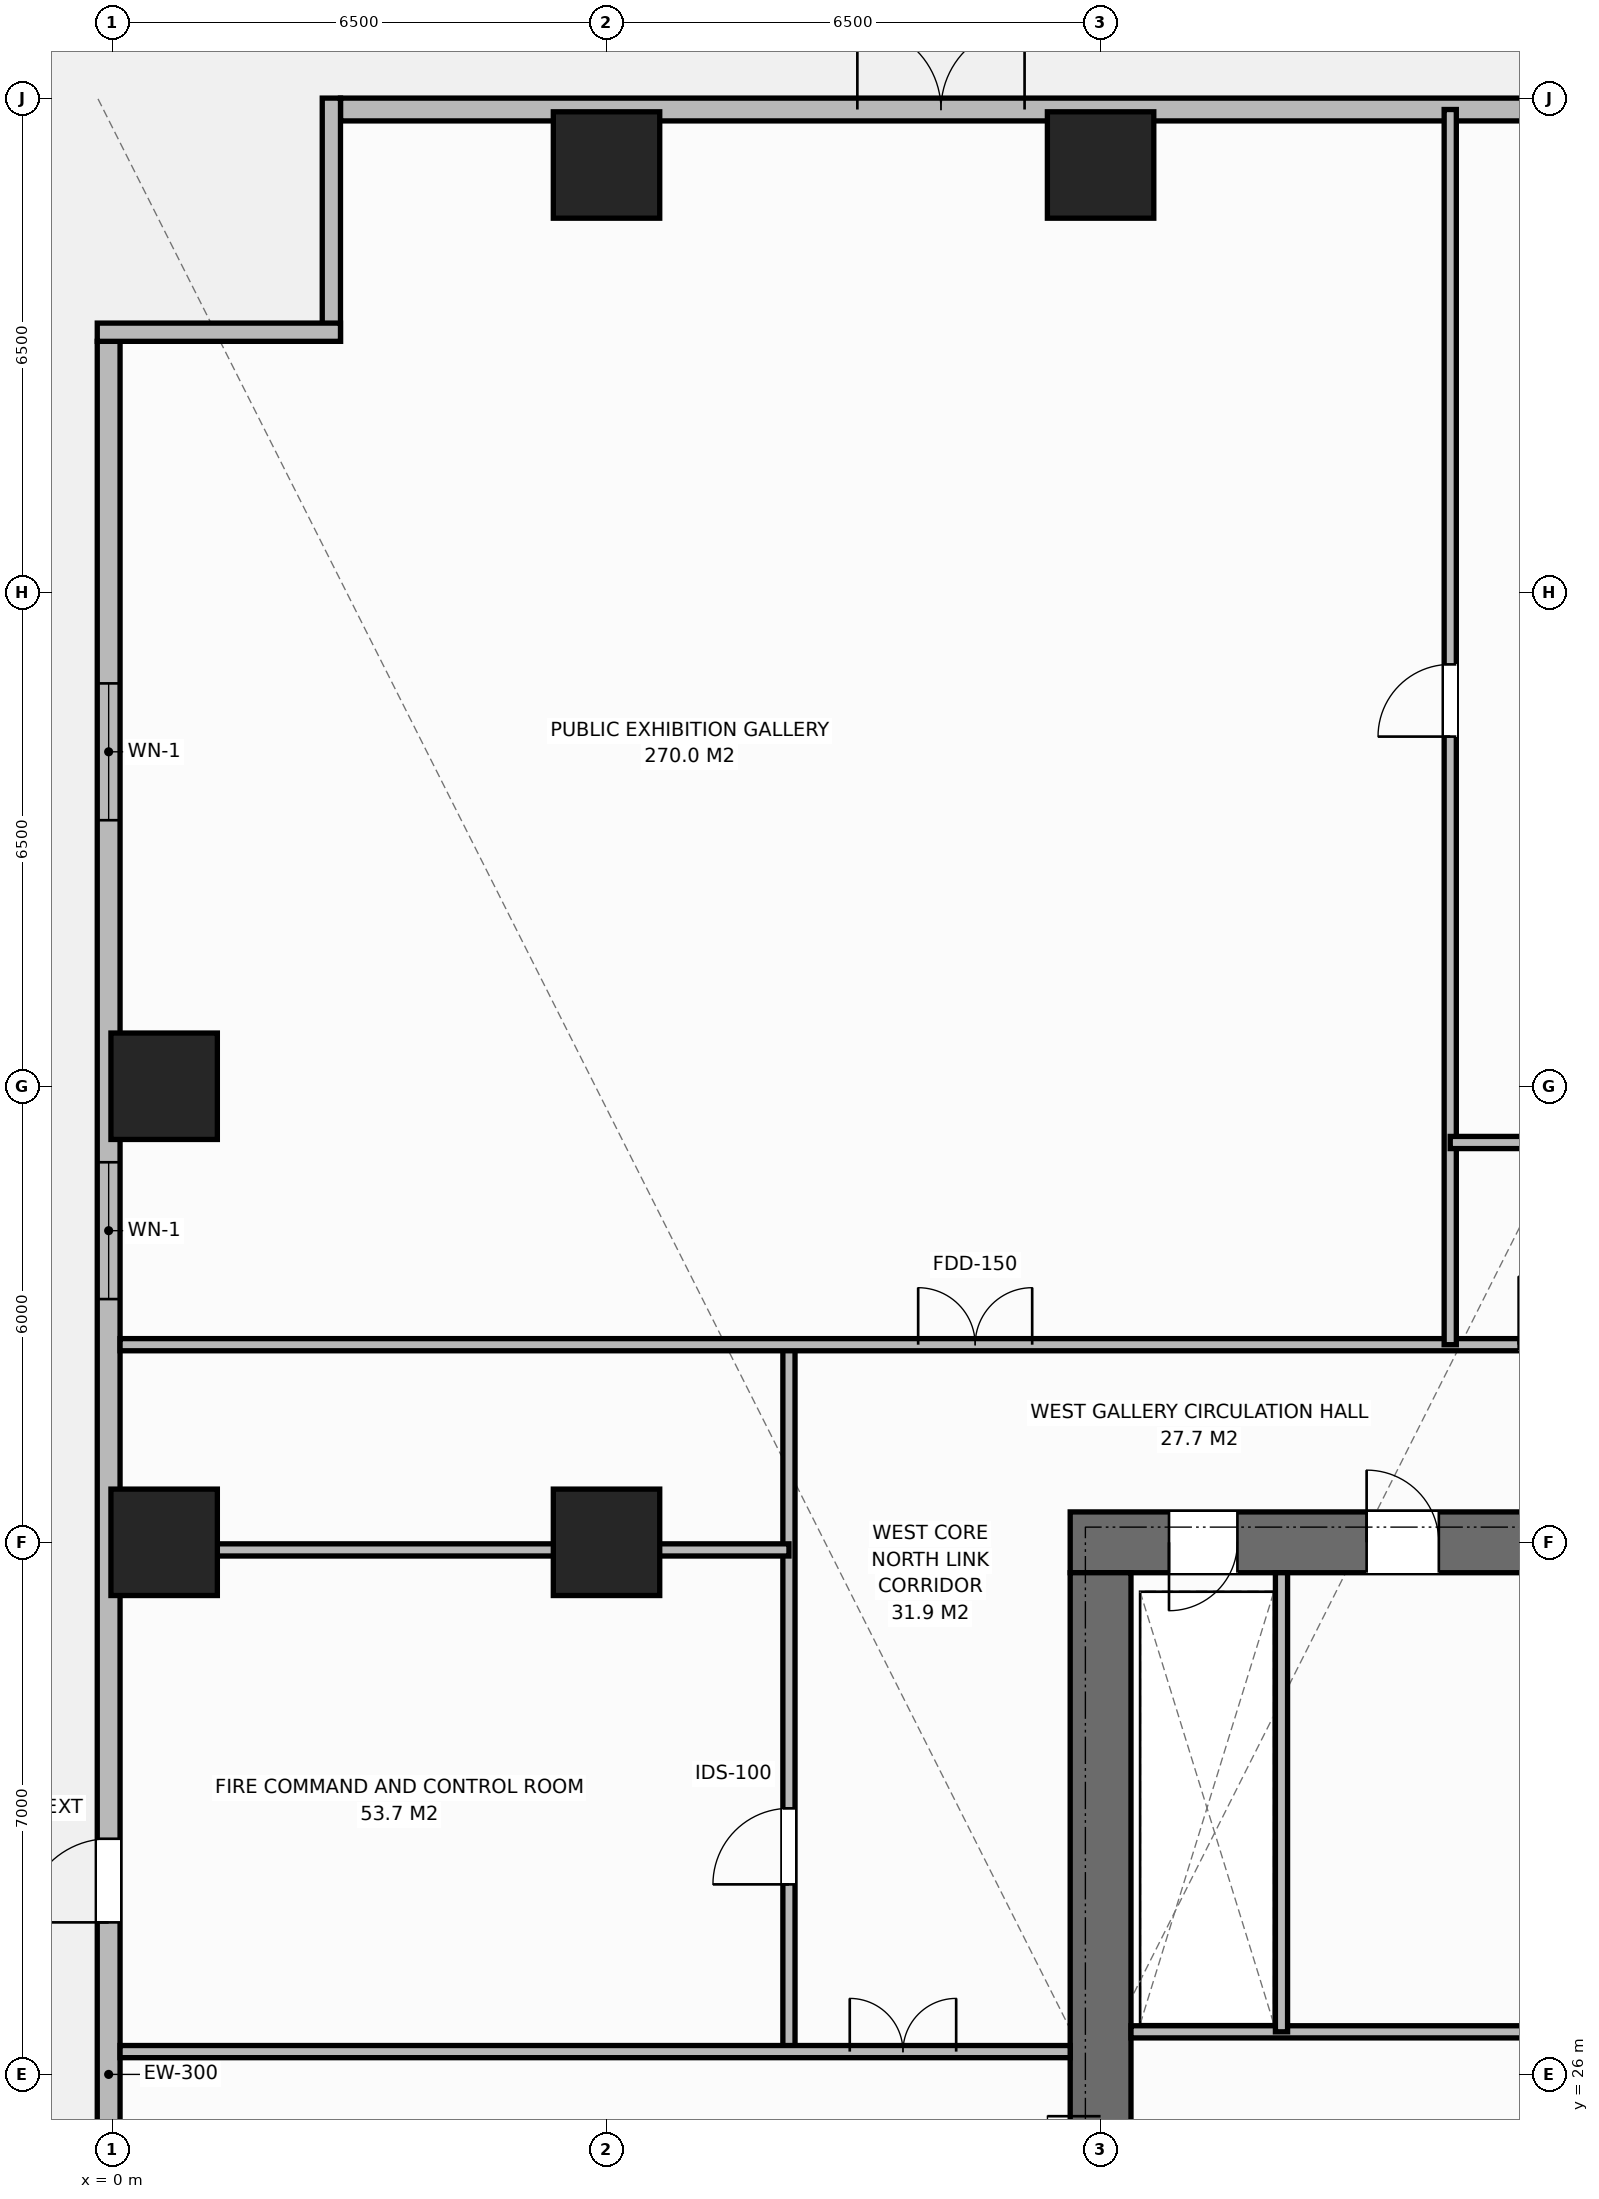
"""IFC4 building model, lengths in metres.
Left out: names, types, materials, properties, quantities, classifications, styles, units other than length and angle.
Written with IfcOpenShell. Run it as: python <this file> out.ifc"""

import sys

from ifc_helpers import new_model, si_unit, direction, frame, frame_2d, origin, origin_2d, place, context, subcontext, project, spatial, rectangle, extrude, element, fill, save


model = new_model("IFC4")
c1 = context("Model", 3, precision=1e-05, world=origin(), true_north=direction((0.0, 1.0)))
c2 = subcontext(c1, "Body", "Model", "MODEL_VIEW")
j1 = project(units=[si_unit("LENGTHUNIT", "METRE"), si_unit("PLANEANGLEUNIT", "RADIAN")], contexts=[c1])
p1 = place(None, origin())
s1 = spatial("IfcSite", under=j1, at=p1, CompositionType="ELEMENT")
p2 = place(p1, origin())
s2 = spatial("IfcBuilding", under=s1, at=p2, CompositionType="ELEMENT")
p3 = place(p2, origin())
s3 = spatial("IfcBuildingStorey", under=s2, at=p3, CompositionType="ELEMENT", Elevation=0.0)
p4 = place(p3, frame((12.6, 33.0, 0.0), z_axis=(0.0, 0.0, 1.0), x_axis=(1.0, 0.0, 0.0)))
e1 = element("IfcWall", 1, at=p4, inside=s3, PredefinedType="SHEAR", context=c2, shape_type="SweptSolid", body=[
    extrude(rectangle(XDim=13.8, YDim=0.8, at=frame_2d((6.9, 0.0))), origin(), (0.0, 0.0, 1.0), 6.0),
])
p5 = place(p4, frame((1.3, 0.0, 0.0)))
e2 = element("IfcOpeningElement", 2, at=p5, cuts=e1, PredefinedType="OPENING", context=c2, shape_type="SweptSolid", body=[
    extrude(rectangle(XDim=0.9, YDim=2.15, at=frame_2d((0.45, 1.075))), frame((0.0, 0.41, 0.0), z_axis=(0.0, -1.0, 0.0), x_axis=(1.0, 0.0, 0.0)), (0.0, 0.0, 1.0), 0.82),
])
p6 = place(p4, frame((3.9, 0.0, 0.0)))
e3 = element("IfcOpeningElement", 3, at=p6, cuts=e1, PredefinedType="OPENING", context=c2, shape_type="SweptSolid", body=[
    extrude(rectangle(XDim=0.95, YDim=2.15, at=frame_2d((0.475, 1.075))), frame((0.0, 0.41, 0.0), z_axis=(0.0, -1.0, 0.0), x_axis=(1.0, 0.0, 0.0)), (0.0, 0.0, 1.0), 0.82),
])
p7 = place(p4, frame((6.9, 0.0, 0.0)))
e4 = element("IfcOpeningElement", 4, at=p7, cuts=e1, PredefinedType="OPENING", context=c2, shape_type="SweptSolid", body=[
    extrude(rectangle(XDim=0.95, YDim=2.15, at=frame_2d((0.475, 1.075))), frame((0.0, 0.41, 0.0), z_axis=(0.0, -1.0, 0.0), x_axis=(1.0, 0.0, 0.0)), (0.0, 0.0, 1.0), 0.82),
])
p8 = place(p4, frame((9.28, 0.0, 0.0)))
e5 = element("IfcOpeningElement", 5, at=p8, cuts=e1, PredefinedType="OPENING", context=c2, shape_type="SweptSolid", body=[
    extrude(rectangle(XDim=1.4, YDim=2.2, at=frame_2d((0.7, 1.1))), frame((0.0, 0.41, 0.0), z_axis=(0.0, -1.0, 0.0), x_axis=(1.0, 0.0, 0.0)), (0.0, 0.0, 1.0), 0.82),
])
p9 = place(p3, frame((13.0, 19.4, 0.0), z_axis=(0.0, 0.0, 1.0), x_axis=(0.0, 1.0, 0.0)))
e6 = element("IfcWall", 6, at=p9, inside=s3, PredefinedType="SHEAR", context=c2, shape_type="SweptSolid", body=[
    extrude(rectangle(XDim=13.2, YDim=0.8, at=frame_2d((6.6, 0.0))), origin(), (0.0, 0.0, 1.0), 6.0),
])
p10 = place(p9, frame((4.65, 0.0, 0.0)))
e7 = element("IfcOpeningElement", 7, at=p10, cuts=e6, PredefinedType="OPENING", context=c2, shape_type="SweptSolid", body=[
    extrude(rectangle(XDim=1.4, YDim=2.2, at=frame_2d((0.7, 1.1))), frame((0.0, 0.41, 0.0), z_axis=(0.0, -1.0, 0.0), x_axis=(1.0, 0.0, 0.0)), (0.0, 0.0, 1.0), 0.82),
])
for number, where, z_axis, x_axis in (
    (8, (6.5, 33.0, 0.0), (0.0, 0.0, 1.0), (1.0, 0.0, 0.0)),
    (9, (6.5, 51.12, 0.0), (0.0, 0.0, 1.0), (1.0, 0.0, 0.0)),
    (10, (13.0, 51.12, 0.0), (0.0, 0.0, 1.0), (1.0, 0.0, 0.0)),
    (11, (0.68, 33.0, 0.0), (0.0, 0.0, 1.0), (1.0, 0.0, 0.0)),
    (12, (0.68, 39.0, 0.0), (0.0, 0.0, 1.0), (1.0, 0.0, 0.0)),
):
    element("IfcColumn", number, at=place(p3, frame(where, z_axis=z_axis, x_axis=x_axis)), inside=s3, PredefinedType="COLUMN", context=c2, shape_type="SweptSolid", body=[
        extrude(rectangle(XDim=1.4, YDim=1.4, at=origin_2d()), origin(), (0.0, 0.0, 1.0), 6.0),
    ])
p11 = place(p3, frame((-0.05, 3.2, 0.0), z_axis=(0.0, 0.0, 1.0), x_axis=(0.0, 1.0, 0.0)))
e13 = element("IfcWall", 13, at=p11, inside=s3, PredefinedType="STANDARD", context=c2, shape_type="SweptSolid", body=[
    extrude(rectangle(XDim=45.6, YDim=0.3, at=frame_2d((22.8, 0.0))), origin(), (0.0, 0.0, 1.0), 5.72),
])
p12 = place(p11, frame((17.8, 0.0, 0.0)))
e14 = element("IfcOpeningElement", 14, at=p12, cuts=e13, PredefinedType="OPENING", context=c2, shape_type="SweptSolid", body=[
    extrude(rectangle(XDim=2.2, YDim=2.4, at=frame_2d((1.1, 1.2))), frame((0.0, 0.16, 0.0), z_axis=(0.0, -1.0, 0.0), x_axis=(1.0, 0.0, 0.0)), (0.0, 0.0, 1.0), 0.32),
])
p13 = place(p11, frame((24.8, 0.0, 0.0)))
e15 = element("IfcOpeningElement", 15, at=p13, cuts=e13, PredefinedType="OPENING", context=c2, shape_type="SweptSolid", body=[
    extrude(rectangle(XDim=1.1, YDim=2.2, at=frame_2d((0.55, 1.1))), frame((0.0, 0.16, 0.0), z_axis=(0.0, -1.0, 0.0), x_axis=(1.0, 0.0, 0.0)), (0.0, 0.0, 1.0), 0.32),
])
p14 = place(p11, frame((4.3, 0.0, 0.9)))
e16 = element("IfcOpeningElement", 16, at=p14, cuts=e13, PredefinedType="OPENING", context=c2, shape_type="SweptSolid", body=[
    extrude(rectangle(XDim=1.8, YDim=2.2, at=frame_2d((0.9, 1.1))), frame((0.0, 0.16, 0.0), z_axis=(0.0, -1.0, 0.0), x_axis=(1.0, 0.0, 0.0)), (0.0, 0.0, 1.0), 0.32),
])
p15 = place(p11, frame((11.3, 0.0, 0.9)))
e17 = element("IfcOpeningElement", 17, at=p15, cuts=e13, PredefinedType="OPENING", context=c2, shape_type="SweptSolid", body=[
    extrude(rectangle(XDim=1.8, YDim=2.2, at=frame_2d((0.9, 1.1))), frame((0.0, 0.16, 0.0), z_axis=(0.0, -1.0, 0.0), x_axis=(1.0, 0.0, 0.0)), (0.0, 0.0, 1.0), 0.32),
])
p16 = place(p11, frame((33.0, 0.0, 0.9)))
e18 = element("IfcOpeningElement", 18, at=p16, cuts=e13, PredefinedType="OPENING", context=c2, shape_type="SweptSolid", body=[
    extrude(rectangle(XDim=1.8, YDim=2.2, at=frame_2d((0.9, 1.1))), frame((0.0, 0.16, 0.0), z_axis=(0.0, -1.0, 0.0), x_axis=(1.0, 0.0, 0.0)), (0.0, 0.0, 1.0), 0.32),
])
p17 = place(p11, frame((39.3, 0.0, 0.9)))
e19 = element("IfcOpeningElement", 19, at=p17, cuts=e13, PredefinedType="OPENING", context=c2, shape_type="SweptSolid", body=[
    extrude(rectangle(XDim=1.8, YDim=2.2, at=frame_2d((0.9, 1.1))), frame((0.0, 0.16, 0.0), z_axis=(0.0, -1.0, 0.0), x_axis=(1.0, 0.0, 0.0)), (0.0, 0.0, 1.0), 0.32),
])
p18 = place(p3, frame((3.0, 51.85, 0.0), z_axis=(0.0, 0.0, 1.0), x_axis=(1.0, 0.0, 0.0)))
e20 = element("IfcWall", 20, at=p18, inside=s3, PredefinedType="STANDARD", context=c2, shape_type="SweptSolid", body=[
    extrude(rectangle(XDim=23.0, YDim=0.3, at=frame_2d((11.5, 0.0))), origin(), (0.0, 0.0, 1.0), 5.72),
])
p19 = place(p18, frame((6.8, 0.0, 0.0)))
e21 = element("IfcOpeningElement", 21, at=p19, cuts=e20, PredefinedType="OPENING", context=c2, shape_type="SweptSolid", body=[
    extrude(rectangle(XDim=2.2, YDim=2.4, at=frame_2d((1.1, 1.2))), frame((0.0, 0.16, 0.0), z_axis=(0.0, -1.0, 0.0), x_axis=(1.0, 0.0, 0.0)), (0.0, 0.0, 1.0), 0.32),
])
for number, where, z_axis, x_axis in (
    (22, (2.88, 48.8, 0.0), (0.0, 0.0, 1.0), (0.0, 1.0, 0.0)),
    (23, (-0.2, 48.92, 0.0), (0.0, 0.0, 1.0), (1.0, 0.0, 0.0)),
):
    element("IfcWall", number, at=place(p3, frame(where, z_axis=z_axis, x_axis=x_axis)), inside=s3, PredefinedType="STANDARD", context=c2, shape_type="SweptSolid", body=[
        extrude(rectangle(XDim=3.2, YDim=0.24, at=frame_2d((1.6, 0.0))), origin(), (0.0, 0.0, 1.0), 5.72),
    ])
p20 = place(p3, frame((13.4, 26.56, 0.0), z_axis=(0.0, 0.0, 1.0), x_axis=(1.0, 0.0, 0.0)))
e24 = element("IfcWall", 24, at=p20, inside=s3, PredefinedType="STANDARD", context=c2, shape_type="SweptSolid", body=[
    extrude(rectangle(XDim=8.34, YDim=0.16, at=frame_2d((4.17, 0.0))), origin(), (0.0, 0.0, 1.0), 5.72),
])
p21 = place(p3, frame((15.38, 26.56, 0.0), z_axis=(0.0, 0.0, 1.0), x_axis=(0.0, 1.0, 0.0)))
e25 = element("IfcWall", 25, at=p21, inside=s3, PredefinedType="STANDARD", context=c2, shape_type="SweptSolid", body=[
    extrude(rectangle(XDim=6.04, YDim=0.16, at=frame_2d((3.02, 0.0))), origin(), (0.0, 0.0, 1.0), 5.72),
])
p22 = place(p3, frame((8.9, 26.3, 0.0), z_axis=(0.0, 0.0, 1.0), x_axis=(0.0, 1.0, 0.0)))
e26 = element("IfcWall", 26, at=p22, inside=s3, PredefinedType="STANDARD", context=c2, shape_type="SweptSolid", body=[
    extrude(rectangle(XDim=9.3, YDim=0.16, at=frame_2d((4.65, 0.0))), origin(), (0.0, 0.0, 1.0), 5.72),
])
p23 = place(p22, frame((2.2, 0.0, 0.0)))
e27 = element("IfcOpeningElement", 27, at=p23, cuts=e26, PredefinedType="OPENING", context=c2, shape_type="SweptSolid", body=[
    extrude(rectangle(XDim=1.0, YDim=2.15, at=frame_2d((0.5, 1.075))), frame((0.0, 0.09, 0.0), z_axis=(0.0, -1.0, 0.0), x_axis=(1.0, 0.0, 0.0)), (0.0, 0.0, 1.0), 0.18),
])
p24 = place(p3, frame((0.1, 32.9, 0.0), z_axis=(0.0, 0.0, 1.0), x_axis=(1.0, 0.0, 0.0)))
e28 = element("IfcWall", 28, at=p24, inside=s3, PredefinedType="STANDARD", context=c2, shape_type="SweptSolid", body=[
    extrude(rectangle(XDim=8.8, YDim=0.16, at=frame_2d((4.4, 0.0))), origin(), (0.0, 0.0, 1.0), 4.92),
])
p25 = place(p3, frame((0.1, 35.6, 0.0), z_axis=(0.0, 0.0, 1.0), x_axis=(1.0, 0.0, 0.0)))
e29 = element("IfcWall", 29, at=p25, inside=s3, PredefinedType="STANDARD", context=c2, shape_type="SweptSolid", body=[
    extrude(rectangle(XDim=25.82, YDim=0.16, at=frame_2d((12.91, 0.0))), origin(), (0.0, 0.0, 1.0), 5.72),
])
p26 = place(p25, frame((10.5, 0.0, 0.0)))
e30 = element("IfcOpeningElement", 30, at=p26, cuts=e29, PredefinedType="OPENING", context=c2, shape_type="SweptSolid", body=[
    extrude(rectangle(XDim=1.5, YDim=2.2, at=frame_2d((0.75, 1.1))), frame((0.0, 0.09, 0.0), z_axis=(0.0, -1.0, 0.0), x_axis=(1.0, 0.0, 0.0)), (0.0, 0.0, 1.0), 0.18),
])
p27 = place(p25, frame((18.4, 0.0, 0.0)))
e31 = element("IfcOpeningElement", 31, at=p27, cuts=e29, PredefinedType="OPENING", context=c2, shape_type="SweptSolid", body=[
    extrude(rectangle(XDim=0.9, YDim=2.15, at=frame_2d((0.45, 1.075))), frame((0.0, 0.09, 0.0), z_axis=(0.0, -1.0, 0.0), x_axis=(1.0, 0.0, 0.0)), (0.0, 0.0, 1.0), 0.18),
])
p28 = place(p25, frame((21.35, 0.0, 0.0)))
e32 = element("IfcOpeningElement", 32, at=p28, cuts=e29, PredefinedType="OPENING", context=c2, shape_type="SweptSolid", body=[
    extrude(rectangle(XDim=0.9, YDim=2.15, at=frame_2d((0.45, 1.075))), frame((0.0, 0.09, 0.0), z_axis=(0.0, -1.0, 0.0), x_axis=(1.0, 0.0, 0.0)), (0.0, 0.0, 1.0), 0.18),
])
p29 = place(p25, frame((23.95, 0.0, 0.0)))
e33 = element("IfcOpeningElement", 33, at=p29, cuts=e29, PredefinedType="OPENING", context=c2, shape_type="SweptSolid", body=[
    extrude(rectangle(XDim=0.9, YDim=2.15, at=frame_2d((0.45, 1.075))), frame((0.0, 0.09, 0.0), z_axis=(0.0, -1.0, 0.0), x_axis=(1.0, 0.0, 0.0)), (0.0, 0.0, 1.0), 0.18),
])
p30 = place(p3, frame((17.6, 35.6, 0.0), z_axis=(0.0, 0.0, 1.0), x_axis=(0.0, 1.0, 0.0)))
e34 = element("IfcWall", 34, at=p30, inside=s3, PredefinedType="STANDARD", context=c2, shape_type="SweptSolid", body=[
    extrude(rectangle(XDim=16.25, YDim=0.16, at=frame_2d((8.125, 0.0))), origin(), (0.0, 0.0, 1.0), 5.72),
])
p31 = place(p30, frame((8.0, 0.0, 0.0)))
e35 = element("IfcOpeningElement", 35, at=p31, cuts=e34, PredefinedType="OPENING", context=c2, shape_type="SweptSolid", body=[
    extrude(rectangle(XDim=0.95, YDim=2.15, at=frame_2d((0.475, 1.075))), frame((0.0, 0.09, 0.0), z_axis=(0.0, -1.0, 0.0), x_axis=(1.0, 0.0, 0.0)), (0.0, 0.0, 1.0), 0.18),
])
p32 = place(p3, frame((17.6, 38.26, 0.0), z_axis=(0.0, 0.0, 1.0), x_axis=(1.0, 0.0, 0.0)))
e36 = element("IfcWall", 36, at=p32, inside=s3, PredefinedType="STANDARD", context=c2, shape_type="SweptSolid", body=[
    extrude(rectangle(XDim=8.24, YDim=0.16, at=frame_2d((4.12, 0.0))), origin(), (0.0, 0.0, 1.0), 5.72),
])
p33 = place(p3, frame((0.1, 26.3, 0.0), z_axis=(0.0, 0.0, 1.0), x_axis=(1.0, 0.0, 0.0)))
e37 = element("IfcWall", 37, at=p33, inside=s3, PredefinedType="STANDARD", context=c2, shape_type="SweptSolid", body=[
    extrude(rectangle(XDim=12.5, YDim=0.16, at=frame_2d((6.25, 0.0))), origin(), (0.0, 0.0, 1.0), 5.72),
])
p34 = place(p33, frame((9.6, 0.0, 0.0)))
e38 = element("IfcOpeningElement", 38, at=p34, cuts=e37, PredefinedType="OPENING", context=c2, shape_type="SweptSolid", body=[
    extrude(rectangle(XDim=1.4, YDim=2.2, at=frame_2d((0.7, 1.1))), frame((0.0, 0.09, 0.0), z_axis=(0.0, -1.0, 0.0), x_axis=(1.0, 0.0, 0.0)), (0.0, 0.0, 1.0), 0.18),
])
p35 = place(p13, origin())
e39 = element("IfcDoor", 39, at=p35, inside=s3, OperationType="SINGLE_SWING_LEFT", PredefinedType="DOOR", context=c2, shape_type="SweptSolid", body=[
    extrude(rectangle(XDim=1.1, YDim=2.2, at=frame_2d((0.55, 1.1))), frame((0.0, 0.025, 0.0), z_axis=(0.0, -1.0, 0.0), x_axis=(1.0, 0.0, 0.0)), (0.0, 0.0, 1.0), 0.05),
])
fill(e15, e39)
p36 = place(p16, origin())
e40 = element("IfcWindow", 40, at=p36, inside=s3, PartitioningType="SINGLE_PANEL", PredefinedType="WINDOW", context=c2, shape_type="SweptSolid", body=[
    extrude(rectangle(XDim=1.8, YDim=2.2, at=frame_2d((0.9, 1.1))), frame((0.0, 0.03, 0.0), z_axis=(0.0, -1.0, 0.0), x_axis=(1.0, 0.0, 0.0)), (0.0, 0.0, 1.0), 0.06),
])
fill(e18, e40)
p37 = place(p17, origin())
e41 = element("IfcWindow", 41, at=p37, inside=s3, PartitioningType="SINGLE_PANEL", PredefinedType="WINDOW", context=c2, shape_type="SweptSolid", body=[
    extrude(rectangle(XDim=1.8, YDim=2.2, at=frame_2d((0.9, 1.1))), frame((0.0, 0.03, 0.0), z_axis=(0.0, -1.0, 0.0), x_axis=(1.0, 0.0, 0.0)), (0.0, 0.0, 1.0), 0.06),
])
fill(e19, e41)
p38 = place(p19, origin())
e42 = element("IfcDoor", 42, at=p38, inside=s3, OperationType="DOUBLE_DOOR_SINGLE_SWING", PredefinedType="DOOR", context=c2, shape_type="SweptSolid", body=[
    extrude(rectangle(XDim=2.2, YDim=2.4, at=frame_2d((1.1, 1.2))), frame((0.0, 0.025, 0.0), z_axis=(0.0, -1.0, 0.0), x_axis=(1.0, 0.0, 0.0)), (0.0, 0.0, 1.0), 0.05),
])
fill(e21, e42)
p39 = place(p10, origin())
e43 = element("IfcDoor", 43, at=p39, inside=s3, OperationType="DOUBLE_DOOR_SINGLE_SWING", PredefinedType="DOOR", context=c2, shape_type="SweptSolid", body=[
    extrude(rectangle(XDim=1.4, YDim=2.2, at=frame_2d((0.7, 1.1))), frame((0.0, 0.025, 0.0), z_axis=(0.0, -1.0, 0.0), x_axis=(1.0, 0.0, 0.0)), (0.0, 0.0, 1.0), 0.05),
])
fill(e7, e43)
p40 = place(p5, origin())
e44 = element("IfcDoor", 44, at=p40, inside=s3, OperationType="SINGLE_SWING_RIGHT", PredefinedType="DOOR", context=c2, shape_type="SweptSolid", body=[
    extrude(rectangle(XDim=0.9, YDim=2.15, at=frame_2d((0.45, 1.075))), frame((0.0, -0.075, 0.0), z_axis=(0.0, -1.0, 0.0), x_axis=(1.0, 0.0, 0.0)), (0.0, 0.0, 1.0), 0.05),
])
fill(e2, e44)
p41 = place(p6, origin())
e45 = element("IfcDoor", 45, at=p41, inside=s3, OperationType="SINGLE_SWING_LEFT", PredefinedType="DOOR", context=c2, shape_type="SweptSolid", body=[
    extrude(rectangle(XDim=0.95, YDim=2.15, at=frame_2d((0.475, 1.075))), frame((0.0, -0.075, 0.0), z_axis=(0.0, -1.0, 0.0), x_axis=(1.0, 0.0, 0.0)), (0.0, 0.0, 1.0), 0.05),
])
fill(e3, e45)
p42 = place(p23, origin())
e46 = element("IfcDoor", 46, at=p42, inside=s3, OperationType="SINGLE_SWING_LEFT", PredefinedType="DOOR", context=c2, shape_type="SweptSolid", body=[
    extrude(rectangle(XDim=1.0, YDim=2.15, at=frame_2d((0.5, 1.075))), frame((0.0, 0.025, 0.0), z_axis=(0.0, -1.0, 0.0), x_axis=(1.0, 0.0, 0.0)), (0.0, 0.0, 1.0), 0.05),
])
fill(e27, e46)
p43 = place(p26, origin())
e47 = element("IfcDoor", 47, at=p43, inside=s3, OperationType="DOUBLE_DOOR_SINGLE_SWING", PredefinedType="DOOR", context=c2, shape_type="SweptSolid", body=[
    extrude(rectangle(XDim=1.5, YDim=2.2, at=frame_2d((0.75, 1.1))), frame((0.0, 0.025, 0.0), z_axis=(0.0, -1.0, 0.0), x_axis=(1.0, 0.0, 0.0)), (0.0, 0.0, 1.0), 0.05),
])
fill(e30, e47)
p44 = place(p31, origin())
e48 = element("IfcDoor", 48, at=p44, inside=s3, OperationType="SINGLE_SWING_LEFT", PredefinedType="DOOR", context=c2, shape_type="SweptSolid", body=[
    extrude(rectangle(XDim=0.95, YDim=2.15, at=frame_2d((0.475, 1.075))), frame((0.0, 0.025, 0.0), z_axis=(0.0, -1.0, 0.0), x_axis=(1.0, 0.0, 0.0)), (0.0, 0.0, 1.0), 0.05),
])
fill(e35, e48)
p45 = place(p34, origin())
e49 = element("IfcDoor", 49, at=p45, inside=s3, OperationType="DOUBLE_DOOR_SINGLE_SWING", PredefinedType="DOOR", context=c2, shape_type="SweptSolid", body=[
    extrude(rectangle(XDim=1.4, YDim=2.2, at=frame_2d((0.7, 1.1))), frame((0.0, 0.025, 0.0), z_axis=(0.0, -1.0, 0.0), x_axis=(1.0, 0.0, 0.0)), (0.0, 0.0, 1.0), 0.05),
])
fill(e38, e49)
save(model, sys.argv[1])
